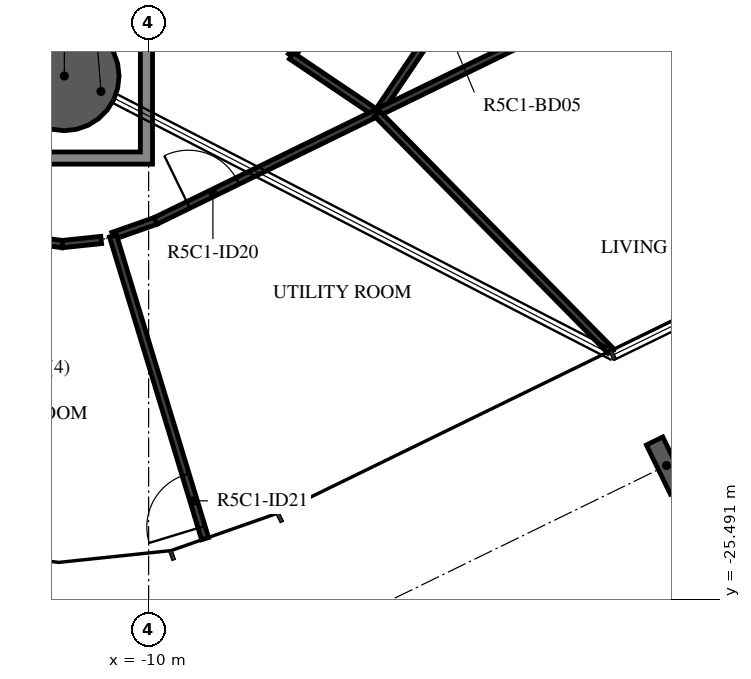
"""IFC4 building model, lengths in metres.
Left out: names, types, materials, properties, quantities, classifications, styles, units other than length and angle.
Written with IfcOpenShell. Run it as: python <this file> out.ifc"""

import sys

from ifc_helpers import new_model, si_unit, direction, frame, frame_2d, origin, origin_2d, place, context, subcontext, project, spatial, polyline, rectangle, hollow_circle, i_section, outline, extrude, element, fill, save


model = new_model("IFC4")
c1 = context("Model", 3, precision=1e-05, world=origin(), true_north=direction((0.0, 1.0)))
c2 = subcontext(c1, "Body", "Model", "MODEL_VIEW")
j1 = project(units=[si_unit("LENGTHUNIT", "METRE"), si_unit("PLANEANGLEUNIT", "RADIAN")], contexts=[c1])
p1 = place(None, origin())
s1 = spatial("IfcSite", under=j1, at=p1, CompositionType="ELEMENT")
p2 = place(p1, origin())
s2 = spatial("IfcBuilding", under=s1, at=p2, CompositionType="ELEMENT")
p3 = place(p2, frame((0.0, 0.0, 212.9)))
s3 = spatial("IfcBuildingStorey", under=s2, at=p3, CompositionType="ELEMENT", Elevation=212.9)
p4 = place(p3, frame((-11.386, -16.881, -0.38), z_axis=(0.0, 0.0, 1.0), x_axis=(1.0, 0.0, 0.0)))
e1 = element("IfcColumn", 1, at=p4, inside=s3, PredefinedType="COLUMN", context=c2, shape_type="SweptSolid", body=[
    extrude(hollow_circle(Radius=0.9, WallThickness=0.04, at=origin_2d()), origin(), (0.0, 0.0, 1.0), 3.5),
])
p5 = place(p3, frame((-1.482, -23.287, -0.38), z_axis=(0.0, 0.0, 1.0), x_axis=(-0.898794095235, -0.438371046456, 0.0)))
e2 = element("IfcColumn", 2, at=p5, inside=s3, PredefinedType="COLUMN", context=c2, shape_type="SweptSolid", body=[
    extrude(i_section(OverallWidth=0.3, OverallDepth=0.9, WebThickness=0.019, FlangeThickness=0.035, FilletRadius=0.03, at=origin_2d()), origin(), (0.0, 0.0, 1.0), 3.5),
])
p6 = place(p3, frame((-5.918, -13.981, 0.0), z_axis=(0.0, 0.0, 1.0), x_axis=(-0.559254999968, -0.828995684555, 0.0)))
e3 = element("IfcWall", 3, at=p6, inside=s3, PredefinedType="PARTITIONING", context=c2, shape_type="SweptSolid", body=[
    extrude(rectangle(XDim=3.099, YDim=0.12, at=frame_2d((1.55, 0.0))), origin(), (0.0, 0.0, 1.0), 3.12),
])
p7 = place(p3, frame((-7.652, -16.55, 0.0), z_axis=(0.0, 0.0, 1.0), x_axis=(0.829053397483, -0.559169441334, 0.0)))
e4 = element("IfcWall", 4, at=p7, inside=s3, PredefinedType="PARTITIONING", context=c2, shape_type="SweptSolid", body=[
    extrude(rectangle(XDim=1.686, YDim=0.12, at=frame_2d((0.843, 0.0))), origin(), (0.0, 0.0, 1.0), 3.12),
])
p8 = place(p3, frame((-6.229, -17.48, 0.0), z_axis=(0.0, 0.0, 1.0), x_axis=(0.559206483048, 0.829028412853, 0.0)))
e5 = element("IfcWall", 5, at=p8, inside=s3, PredefinedType="PARTITIONING", context=c2, shape_type="SweptSolid", body=[
    extrude(rectangle(XDim=3.432, YDim=0.12, at=frame_2d((1.716, 0.0))), origin(), (0.0, 0.0, 1.0), 3.12),
])
p9 = place(p8, frame((1.5, 0.0, 0.0)))
e6 = element("IfcOpeningElement", 6, at=p9, cuts=e5, PredefinedType="OPENING", context=c2, shape_type="SweptSolid", body=[
    extrude(rectangle(XDim=0.8, YDim=2.1, at=frame_2d((0.4, 1.05))), frame((0.0, 0.07, 0.0), z_axis=(0.0, -1.0, 0.0), x_axis=(1.0, 0.0, 0.0)), (0.0, 0.0, 1.0), 0.14),
])
p10 = place(p3, frame((-12.055, -19.563, 0.0), z_axis=(0.0, 0.0, 1.0), x_axis=(0.991802759529, -0.127778269633, 0.0)))
e7 = element("IfcWall", 7, at=p10, inside=s3, PredefinedType="PARTITIONING", context=c2, shape_type="SweptSolid", body=[
    extrude(rectangle(XDim=0.642, YDim=0.12, at=frame_2d((0.321, 0.0))), origin(), (0.0, 0.0, 1.0), 3.12),
])
p11 = place(p3, frame((-11.418, -19.645, 0.0), z_axis=(0.0, 0.0, 1.0), x_axis=(0.994515867502, 0.104585798686, 0.0)))
e8 = element("IfcWall", 8, at=p11, inside=s3, PredefinedType="PARTITIONING", context=c2, shape_type="SweptSolid", body=[
    extrude(rectangle(XDim=0.642, YDim=0.12, at=frame_2d((0.321, 0.0))), origin(), (0.0, 0.0, 1.0), 3.12),
])
p12 = place(p3, frame((-10.586, -19.51, 0.0), z_axis=(0.0, 0.0, 1.0), x_axis=(0.943560277016, 0.3312008509, 0.0)))
e9 = element("IfcWall", 9, at=p12, inside=s3, PredefinedType="PARTITIONING", context=c2, shape_type="SweptSolid", body=[
    extrude(rectangle(XDim=0.741, YDim=0.12, at=frame_2d((0.371, 0.0))), origin(), (0.0, 0.0, 1.0), 3.12),
])
p13 = place(p3, frame((-9.886, -19.264, 0.0), z_axis=(0.0, 0.0, 1.0), x_axis=(0.898796326112, 0.43836647245, 0.0)))
e10 = element("IfcWall", 10, at=p13, inside=s3, PredefinedType="PARTITIONING", context=c2, shape_type="SweptSolid", body=[
    extrude(rectangle(XDim=10.014, YDim=0.12, at=frame_2d((5.007, 0.0))), origin(), (0.0, 0.0, 1.0), 3.12),
])
p14 = place(p13, frame((0.6, 0.0, 0.0)))
e11 = element("IfcOpeningElement", 11, at=p14, cuts=e10, PredefinedType="OPENING", context=c2, shape_type="SweptSolid", body=[
    extrude(rectangle(XDim=0.9, YDim=2.1, at=frame_2d((0.45, 1.05))), frame((0.0, 0.07, 0.0), z_axis=(0.0, -1.0, 0.0), x_axis=(1.0, 0.0, 0.0)), (0.0, 0.0, 1.0), 0.14),
])
p15 = place(p3, frame((-9.072, -24.489, 0.0), z_axis=(0.0, 0.0, 1.0), x_axis=(-0.291025348593, 0.956715342449, 0.0)))
e12 = element("IfcWall", 12, at=p15, inside=s3, PredefinedType="PARTITIONING", context=c2, shape_type="SweptSolid", body=[
    extrude(rectangle(XDim=5.205, YDim=0.12, at=frame_2d((2.602, 0.0))), origin(), (0.0, 0.0, 1.0), 3.12),
])
p16 = place(p15, frame((0.2, 0.0, 0.0)))
e13 = element("IfcOpeningElement", 13, at=p16, cuts=e12, PredefinedType="OPENING", context=c2, shape_type="SweptSolid", body=[
    extrude(rectangle(XDim=0.9, YDim=2.1, at=frame_2d((0.45, 1.05))), frame((0.0, 0.07, 0.0), z_axis=(0.0, -1.0, 0.0), x_axis=(1.0, 0.0, 0.0)), (0.0, 0.0, 1.0), 0.14),
])
p17 = place(p3, frame((-2.403, -21.4, 0.0), z_axis=(0.0, 0.0, 1.0), x_axis=(-0.70162063199, 0.712550692067, 0.0)))
e14 = element("IfcWall", 14, at=p17, inside=s3, PredefinedType="PARTITIONING", context=c2, shape_type="SweptSolid", body=[
    extrude(rectangle(XDim=5.472, YDim=0.12, at=frame_2d((2.736, 0.0))), origin(), (0.0, 0.0, 1.0), 3.12),
])
p18 = place(p3, origin())
e15 = element("IfcWall", 15, at=p18, inside=s3, PredefinedType="STANDARD", context=c2, shape_type="SweptSolid", body=[
    extrude(outline(polyline([(-9.936, -15.43), (-9.936, -18.331), (-12.836, -18.331), (-12.836, -15.43), (-9.936, -15.43)]), holes=[polyline([(-12.636, -18.131), (-10.136, -18.131), (-10.136, -15.631), (-12.636, -15.631), (-12.636, -18.131)])]), origin(), (0.0, 0.0, 1.0), 3.12),
])
p19 = place(p14, origin())
e16 = element("IfcDoor", 16, at=p19, inside=s3, OperationType="SINGLE_SWING_LEFT", PredefinedType="DOOR", context=c2, shape_type="SweptSolid", body=[
    extrude(rectangle(XDim=0.9, YDim=2.1, at=frame_2d((0.45, 1.05))), frame((0.0, 0.025, 0.0), z_axis=(0.0, -1.0, 0.0), x_axis=(1.0, 0.0, 0.0)), (0.0, 0.0, 1.0), 0.05),
])
fill(e11, e16)
p20 = place(p16, origin())
e17 = element("IfcDoor", 17, at=p20, inside=s3, OperationType="SINGLE_SWING_LEFT", PredefinedType="DOOR", context=c2, shape_type="SweptSolid", body=[
    extrude(rectangle(XDim=0.9, YDim=2.1, at=frame_2d((0.45, 1.05))), frame((0.0, 0.025, 0.0), z_axis=(0.0, -1.0, 0.0), x_axis=(1.0, 0.0, 0.0)), (0.0, 0.0, 1.0), 0.05),
])
fill(e13, e17)
save(model, sys.argv[1])
